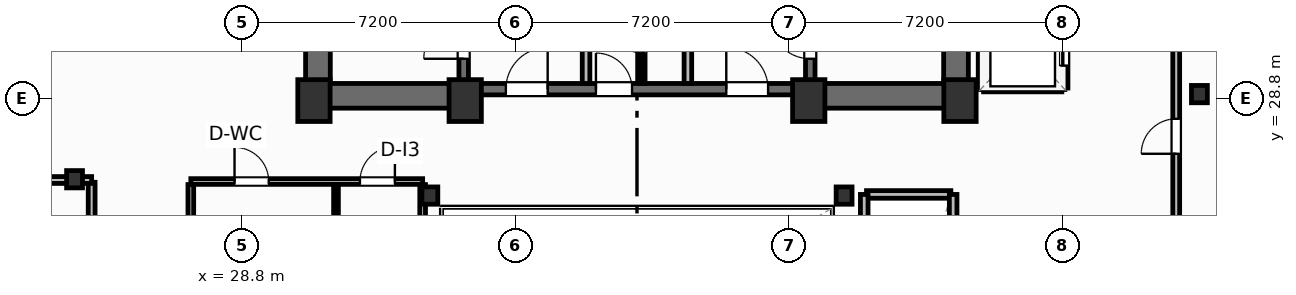
"""IFC4 building model, lengths in metres.
Left out: names, types, materials, properties, quantities, classifications, styles, units other than length and angle.
Written with IfcOpenShell. Run it as: python <this file> out.ifc"""

import sys

from ifc_helpers import new_model, si_unit, direction, frame, frame_2d, origin, origin_2d, place, context, subcontext, project, spatial, rectangle, i_section, extrude, element, fill, save


model = new_model("IFC4")
c1 = context("Model", 3, precision=1e-05, world=origin(), true_north=direction((0.0, 1.0)))
c2 = subcontext(c1, "Body", "Model", "MODEL_VIEW")
j1 = project(units=[si_unit("LENGTHUNIT", "METRE"), si_unit("PLANEANGLEUNIT", "RADIAN")], contexts=[c1])
p1 = place(None, origin())
s1 = spatial("IfcSite", under=j1, at=p1, CompositionType="ELEMENT")
p2 = place(p1, origin())
s2 = spatial("IfcBuilding", under=s1, at=p2, CompositionType="ELEMENT")
p3 = place(p2, frame((0.0, 0.0, 182.0)))
s3 = spatial("IfcBuildingStorey", under=s2, at=p3, CompositionType="ELEMENT", Elevation=182.0)
for number, where, z_axis, x_axis in (
    (1, (30.7, 28.75, 0.0), (0.0, 0.0, 1.0), (1.0, 0.0, 0.0)),
    (2, (34.68, 28.75, 0.0), (0.0, 0.0, 1.0), (1.0, 0.0, 0.0)),
    (3, (43.72, 28.75, 0.0), (0.0, 0.0, 1.0), (1.0, 0.0, 0.0)),
    (4, (47.7, 28.75, 0.0), (0.0, 0.0, 1.0), (1.0, 0.0, 0.0)),
):
    element("IfcColumn", number, at=place(p3, frame(where, z_axis=z_axis, x_axis=x_axis)), inside=s3, PredefinedType="COLUMN", context=c2, shape_type="SweptSolid", body=[
        extrude(rectangle(XDim=0.85, YDim=1.1, at=origin_2d()), origin(), (0.0, 0.0, 1.0), 3.7),
    ])
for number, where, z_axis, x_axis in (
    (5, (33.75, 26.25, 0.0), (0.0, 0.0, 1.0), (1.0, 0.0, 0.0)),
    (6, (44.65, 26.25, 0.0), (0.0, 0.0, 1.0), (1.0, 0.0, 0.0)),
    (7, (24.4, 26.68, 0.0), (0.0, 0.0, 1.0), (1.0, 0.0, 0.0)),
    (8, (54.0, 28.92, 0.0), (0.0, 0.0, 1.0), (1.0, 0.0, 0.0)),
):
    element("IfcColumn", number, at=place(p3, frame(where, z_axis=z_axis, x_axis=x_axis)), inside=s3, PredefinedType="COLUMN", context=c2, shape_type="SweptSolid", body=[
        extrude(i_section(OverallWidth=0.418, OverallDepth=0.455, WebThickness=0.042, FlangeThickness=0.068, FilletRadius=0.025, at=origin_2d()), origin(), (0.0, 0.0, 1.0), 3.7),
    ])
for number, where, z_axis, x_axis in (
    (9, (30.805, 29.2, 0.0), (0.0, 0.0, 1.0), (0.0, 1.0, 0.0)),
    (10, (47.595, 29.2, 0.0), (0.0, 0.0, 1.0), (0.0, 1.0, 0.0)),
):
    element("IfcWall", number, at=place(p3, frame(where, z_axis=z_axis, x_axis=x_axis)), inside=s3, PredefinedType="SHEAR", context=c2, shape_type="SweptSolid", body=[
        extrude(rectangle(XDim=9.22, YDim=0.65, at=frame_2d((4.61, 0.0))), origin(), (0.0, 0.0, 1.0), 3.45),
    ])
p4 = place(p3, frame((30.48, 28.875, 0.0), z_axis=(0.0, 0.0, 1.0), x_axis=(1.0, 0.0, 0.0)))
e11 = element("IfcWall", 11, at=p4, inside=s3, PredefinedType="SHEAR", context=c2, shape_type="SweptSolid", body=[
    extrude(rectangle(XDim=4.32, YDim=0.65, at=frame_2d((2.16, 0.0))), origin(), (0.0, 0.0, 1.0), 3.45),
])
p5 = place(p3, frame((43.6, 28.875, 0.0), z_axis=(0.0, 0.0, 1.0), x_axis=(1.0, 0.0, 0.0)))
e12 = element("IfcWall", 12, at=p5, inside=s3, PredefinedType="SHEAR", context=c2, shape_type="SweptSolid", body=[
    extrude(rectangle(XDim=4.32, YDim=0.65, at=frame_2d((2.16, 0.0))), origin(), (0.0, 0.0, 1.0), 3.45),
])
p6 = place(p3, frame((34.8, 29.05, 0.0), z_axis=(0.0, 0.0, 1.0), x_axis=(1.0, 0.0, 0.0)))
e13 = element("IfcWall", 13, at=p6, inside=s3, PredefinedType="SHEAR", context=c2, shape_type="SweptSolid", body=[
    extrude(rectangle(XDim=8.8, YDim=0.3, at=frame_2d((4.4, 0.0))), origin(), (0.0, 0.0, 1.0), 3.45),
])
p7 = place(p6, frame((0.95, 0.0, 0.0)))
e14 = element("IfcOpeningElement", 14, at=p7, cuts=e13, PredefinedType="OPENING", context=c2, shape_type="SweptSolid", body=[
    extrude(rectangle(XDim=1.1, YDim=2.15, at=frame_2d((0.55, 1.075))), frame((0.0, 0.16, 0.0), z_axis=(0.0, -1.0, 0.0), x_axis=(1.0, 0.0, 0.0)), (0.0, 0.0, 1.0), 0.32),
])
p8 = place(p6, frame((6.75, 0.0, 0.0)))
e15 = element("IfcOpeningElement", 15, at=p8, cuts=e13, PredefinedType="OPENING", context=c2, shape_type="SweptSolid", body=[
    extrude(rectangle(XDim=1.1, YDim=2.15, at=frame_2d((0.55, 1.075))), frame((0.0, 0.16, 0.0), z_axis=(0.0, -1.0, 0.0), x_axis=(1.0, 0.0, 0.0)), (0.0, 0.0, 1.0), 0.32),
])
p9 = place(p6, frame((3.32, 0.0, 0.0)))
e16 = element("IfcOpeningElement", 16, at=p9, cuts=e13, PredefinedType="OPENING", context=c2, shape_type="SweptSolid", body=[
    extrude(rectangle(XDim=0.95, YDim=2.15, at=frame_2d((0.475, 1.075))), frame((0.0, 0.16, 0.0), z_axis=(0.0, -1.0, 0.0), x_axis=(1.0, 0.0, 0.0)), (0.0, 0.0, 1.0), 0.32),
])
p10 = place(p3, frame((34.64, 29.2, 0.0), z_axis=(0.0, 0.0, 1.0), x_axis=(0.0, 1.0, 0.0)))
e17 = element("IfcWall", 17, at=p10, inside=s3, PredefinedType="SHEAR", context=c2, shape_type="SweptSolid", body=[
    extrude(rectangle(XDim=9.22, YDim=0.25, at=frame_2d((4.61, 0.0))), origin(), (0.0, 0.0, 1.0), 3.45),
])
p11 = place(p10, frame((0.65, 0.0, 0.0)))
e18 = element("IfcOpeningElement", 18, at=p11, cuts=e17, PredefinedType="OPENING", context=c2, shape_type="SweptSolid", body=[
    extrude(rectangle(XDim=1.05, YDim=2.15, at=frame_2d((0.525, 1.075))), frame((0.0, 0.135, 0.0), z_axis=(0.0, -1.0, 0.0), x_axis=(1.0, 0.0, 0.0)), (0.0, 0.0, 1.0), 0.27),
])
p12 = place(p3, frame((43.76, 29.2, 0.0), z_axis=(0.0, 0.0, 1.0), x_axis=(0.0, 1.0, 0.0)))
e19 = element("IfcWall", 19, at=p12, inside=s3, PredefinedType="SHEAR", context=c2, shape_type="SweptSolid", body=[
    extrude(rectangle(XDim=9.22, YDim=0.25, at=frame_2d((4.61, 0.0))), origin(), (0.0, 0.0, 1.0), 3.45),
])
p13 = place(p12, frame((0.65, 0.0, 0.0)))
e20 = element("IfcOpeningElement", 20, at=p13, cuts=e19, PredefinedType="OPENING", context=c2, shape_type="SweptSolid", body=[
    extrude(rectangle(XDim=1.05, YDim=2.15, at=frame_2d((0.525, 1.075))), frame((0.0, 0.135, 0.0), z_axis=(0.0, -1.0, 0.0), x_axis=(1.0, 0.0, 0.0)), (0.0, 0.0, 1.0), 0.27),
])
p14 = place(p3, frame((24.85, 23.03, 0.0), z_axis=(0.0, 0.0, 1.0), x_axis=(0.0, 1.0, 0.0)))
e21 = element("IfcWall", 21, at=p14, inside=s3, PredefinedType="PARTITIONING", context=c2, shape_type="SweptSolid", body=[
    extrude(rectangle(XDim=3.57, YDim=0.18, at=frame_2d((1.785, 0.0))), origin(), (0.0, 0.0, 1.0), 3.45),
])
p15 = place(p14, frame((1.5, 0.0, 0.0)))
e22 = element("IfcOpeningElement", 22, at=p15, cuts=e21, PredefinedType="OPENING", context=c2, shape_type="SweptSolid", body=[
    extrude(rectangle(XDim=0.92, YDim=2.05, at=frame_2d((0.46, 1.025))), frame((0.0, 0.1, 0.0), z_axis=(0.0, -1.0, 0.0), x_axis=(1.0, 0.0, 0.0)), (0.0, 0.0, 1.0), 0.2),
])
p16 = place(p3, frame((3.658, 26.66, 0.0), z_axis=(0.0, 0.0, 1.0), x_axis=(1.0, 0.0, 0.0)))
e23 = element("IfcWall", 23, at=p16, inside=s3, PredefinedType="PARTITIONING", context=c2, shape_type="SweptSolid", body=[
    extrude(rectangle(XDim=21.192, YDim=0.18, at=frame_2d((10.596, 0.0))), origin(), (0.0, 0.0, 1.0), 2.662),
])
p17 = place(p3, frame((53.39, 19.28, 0.0), z_axis=(0.0, 0.0, 1.0), x_axis=(0.0, 1.0, 0.0)))
e24 = element("IfcWall", 24, at=p17, inside=s3, PredefinedType="PARTITIONING", context=c2, shape_type="SweptSolid", body=[
    extrude(rectangle(XDim=20.02, YDim=0.18, at=frame_2d((10.01, 0.0))), origin(), (0.0, 0.0, 1.0), 3.45),
])
p18 = place(p17, frame((8.07, 0.0, 0.0)))
e25 = element("IfcOpeningElement", 25, at=p18, cuts=e24, PredefinedType="OPENING", context=c2, shape_type="SweptSolid", body=[
    extrude(rectangle(XDim=0.92, YDim=2.05, at=frame_2d((0.46, 1.025))), frame((0.0, 0.1, 0.0), z_axis=(0.0, -1.0, 0.0), x_axis=(1.0, 0.0, 0.0)), (0.0, 0.0, 1.0), 0.2),
])
for number, where, z_axis, x_axis in (
    (26, (37.86, 29.2, 0.0), (0.0, 0.0, 1.0), (0.0, 1.0, 0.0)),
    (27, (40.54, 29.2, 0.0), (0.0, 0.0, 1.0), (0.0, 1.0, 0.0)),
):
    element("IfcWall", number, at=place(p3, frame(where, z_axis=z_axis, x_axis=x_axis)), inside=s3, PredefinedType="PARTITIONING", context=c2, shape_type="SweptSolid", body=[
        extrude(rectangle(XDim=5.18, YDim=0.2, at=frame_2d((2.59, 0.0))), origin(), (0.0, 0.0, 1.0), 3.45),
    ])
p19 = place(p3, frame((39.35, 29.2, 0.0), z_axis=(0.0, 0.0, 1.0), x_axis=(0.0, 1.0, 0.0)))
e28 = element("IfcWall", 28, at=p19, inside=s3, PredefinedType="PARTITIONING", context=c2, shape_type="SweptSolid", body=[
    extrude(rectangle(XDim=5.22, YDim=0.125, at=frame_2d((2.61, 0.0))), origin(), (0.0, 0.0, 1.0), 3.45),
])
p20 = place(p19, frame((0.8, 0.0, 0.0)))
e29 = element("IfcOpeningElement", 29, at=p20, cuts=e28, PredefinedType="OPENING", context=c2, shape_type="SweptSolid", body=[
    extrude(rectangle(XDim=0.85, YDim=2.05, at=frame_2d((0.425, 1.025))), frame((0.0, 0.073, 0.0), z_axis=(0.0, -1.0, 0.0), x_axis=(1.0, 0.0, 0.0)), (0.0, 0.0, 1.0), 0.145),
])
p21 = place(p19, frame((3.4, 0.0, 0.0)))
e30 = element("IfcOpeningElement", 30, at=p21, cuts=e28, PredefinedType="OPENING", context=c2, shape_type="SweptSolid", body=[
    extrude(rectangle(XDim=0.85, YDim=2.05, at=frame_2d((0.425, 1.025))), frame((0.0, 0.073, 0.0), z_axis=(0.0, -1.0, 0.0), x_axis=(1.0, 0.0, 0.0)), (0.0, 0.0, 1.0), 0.145),
])
p22 = place(p3, frame((27.46, 26.62, 0.0), z_axis=(0.0, 0.0, 1.0), x_axis=(1.0, 0.0, 0.0)))
e31 = element("IfcWall", 31, at=p22, inside=s3, PredefinedType="PARTITIONING", context=c2, shape_type="SweptSolid", body=[
    extrude(rectangle(XDim=6.1, YDim=0.15, at=frame_2d((3.05, 0.0))), origin(), (0.0, 0.0, 1.0), 2.662),
])
p23 = place(p22, frame((1.15, 0.0, 0.0)))
e32 = element("IfcOpeningElement", 32, at=p23, cuts=e31, PredefinedType="OPENING", context=c2, shape_type="SweptSolid", body=[
    extrude(rectangle(XDim=0.9, YDim=2.05, at=frame_2d((0.45, 1.025))), frame((0.0, 0.085, 0.0), z_axis=(0.0, -1.0, 0.0), x_axis=(1.0, 0.0, 0.0)), (0.0, 0.0, 1.0), 0.17),
])
p24 = place(p22, frame((4.45, 0.0, 0.0)))
e33 = element("IfcOpeningElement", 33, at=p24, cuts=e31, PredefinedType="OPENING", context=c2, shape_type="SweptSolid", body=[
    extrude(rectangle(XDim=0.92, YDim=2.05, at=frame_2d((0.46, 1.025))), frame((0.0, 0.085, 0.0), z_axis=(0.0, -1.0, 0.0), x_axis=(1.0, 0.0, 0.0)), (0.0, 0.0, 1.0), 0.17),
])
p25 = place(p3, frame((31.28, 19.38, 0.0), z_axis=(0.0, 0.0, 1.0), x_axis=(0.0, 1.0, 0.0)))
e34 = element("IfcWall", 34, at=p25, inside=s3, PredefinedType="PARTITIONING", context=c2, shape_type="SweptSolid", body=[
    extrude(rectangle(XDim=7.16, YDim=0.125, at=frame_2d((3.58, 0.0))), origin(), (0.0, 0.0, 1.0), 3.45),
])
p26 = place(p3, frame((27.46, 19.38, 0.0), z_axis=(0.0, 0.0, 1.0), x_axis=(0.0, 1.0, 0.0)))
e35 = element("IfcWall", 35, at=p26, inside=s3, PredefinedType="PARTITIONING", context=c2, shape_type="SweptSolid", body=[
    extrude(rectangle(XDim=7.16, YDim=0.15, at=frame_2d((3.58, 0.0))), origin(), (0.0, 0.0, 1.0), 3.45),
])
p27 = place(p26, frame((1.4, 0.0, 0.0)))
e36 = element("IfcOpeningElement", 36, at=p27, cuts=e35, PredefinedType="OPENING", context=c2, shape_type="SweptSolid", body=[
    extrude(rectangle(XDim=0.95, YDim=2.05, at=frame_2d((0.475, 1.025))), frame((0.0, 0.085, 0.0), z_axis=(0.0, -1.0, 0.0), x_axis=(1.0, 0.0, 0.0)), (0.0, 0.0, 1.0), 0.17),
])
p28 = place(p3, frame((33.56, 19.38, 0.0), z_axis=(0.0, 0.0, 1.0), x_axis=(0.0, 1.0, 0.0)))
e37 = element("IfcWall", 37, at=p28, inside=s3, PredefinedType="PARTITIONING", context=c2, shape_type="SweptSolid", body=[
    extrude(rectangle(XDim=7.16, YDim=0.15, at=frame_2d((3.58, 0.0))), origin(), (0.0, 0.0, 1.0), 2.824),
])
p29 = place(p3, frame((48.32, 29.08, 0.0), z_axis=(0.0, 0.0, 1.0), x_axis=(1.0, 0.0, 0.0)))
e38 = element("IfcWall", 38, at=p29, inside=s3, PredefinedType="PARTITIONING", context=c2, shape_type="SweptSolid", body=[
    extrude(rectangle(XDim=2.06, YDim=0.2, at=frame_2d((1.03, 0.0))), origin(), (0.0, 0.0, 1.0), 2.662),
])
p30 = place(p3, frame((48.28, 29.08, 0.0), z_axis=(0.0, 0.0, 1.0), x_axis=(0.0, 1.0, 0.0)))
e39 = element("IfcWall", 39, at=p30, inside=s3, PredefinedType="PARTITIONING", context=c2, shape_type="SweptSolid", body=[
    extrude(rectangle(XDim=6.89, YDim=0.2, at=frame_2d((3.445, 0.0))), origin(), (0.0, 0.0, 1.0), 3.45),
])
p31 = place(p3, frame((50.44, 29.08, 0.0), z_axis=(0.0, 0.0, 1.0), x_axis=(0.0, 1.0, 0.0)))
e40 = element("IfcWall", 40, at=p31, inside=s3, PredefinedType="PARTITIONING", context=c2, shape_type="SweptSolid", body=[
    extrude(rectangle(XDim=6.89, YDim=0.2, at=frame_2d((3.445, 0.0))), origin(), (0.0, 0.0, 1.0), 3.45),
])
p32 = place(p31, frame((0.59, 0.0, 0.0)))
e41 = element("IfcOpeningElement", 41, at=p32, cuts=e40, PredefinedType="OPENING", context=c2, shape_type="SweptSolid", body=[
    extrude(rectangle(XDim=1.1, YDim=2.15, at=frame_2d((0.55, 1.075))), frame((0.0, 0.11, 0.0), z_axis=(0.0, -1.0, 0.0), x_axis=(1.0, 0.0, 0.0)), (0.0, 0.0, 1.0), 0.22),
])
p33 = place(p31, frame((2.89, 0.0, 0.0)))
e42 = element("IfcOpeningElement", 42, at=p33, cuts=e40, PredefinedType="OPENING", context=c2, shape_type="SweptSolid", body=[
    extrude(rectangle(XDim=1.1, YDim=2.15, at=frame_2d((0.55, 1.075))), frame((0.0, 0.11, 0.0), z_axis=(0.0, -1.0, 0.0), x_axis=(1.0, 0.0, 0.0)), (0.0, 0.0, 1.0), 0.22),
])
p34 = place(p31, frame((5.19, 0.0, 0.0)))
e43 = element("IfcOpeningElement", 43, at=p34, cuts=e40, PredefinedType="OPENING", context=c2, shape_type="SweptSolid", body=[
    extrude(rectangle(XDim=1.1, YDim=2.15, at=frame_2d((0.55, 1.075))), frame((0.0, 0.11, 0.0), z_axis=(0.0, -1.0, 0.0), x_axis=(1.0, 0.0, 0.0)), (0.0, 0.0, 1.0), 0.22),
])
p35 = place(p3, frame((45.24, 26.28, 0.0), z_axis=(0.0, 0.0, 1.0), x_axis=(1.0, 0.0, 0.0)))
e44 = element("IfcWall", 44, at=p35, inside=s3, PredefinedType="PARTITIONING", context=c2, shape_type="SweptSolid", body=[
    extrude(rectangle(XDim=2.22, YDim=0.2, at=frame_2d((1.11, 0.0))), origin(), (0.0, 0.0, 1.0), 3.45),
])
for number, where, z_axis, x_axis in (
    (45, (45.18, 19.38, 0.0), (0.0, 0.0, 1.0), (0.0, 1.0, 0.0)),
    (46, (47.52, 19.38, 0.0), (0.0, 0.0, 1.0), (0.0, 1.0, 0.0)),
):
    element("IfcWall", number, at=place(p3, frame(where, z_axis=z_axis, x_axis=x_axis)), inside=s3, PredefinedType="PARTITIONING", context=c2, shape_type="SweptSolid", body=[
        extrude(rectangle(XDim=6.9, YDim=0.2, at=frame_2d((3.45, 0.0))), origin(), (0.0, 0.0, 1.0), 3.45),
    ])
p36 = place(p18, origin())
e47 = element("IfcDoor", 47, at=p36, inside=s3, OperationType="SINGLE_SWING_LEFT", PredefinedType="DOOR", context=c2, shape_type="SweptSolid", body=[
    extrude(rectangle(XDim=0.92, YDim=2.05, at=frame_2d((0.46, 1.025))), frame((0.0, 0.025, 0.0), z_axis=(0.0, -1.0, 0.0), x_axis=(1.0, 0.0, 0.0)), (0.0, 0.0, 1.0), 0.05),
])
fill(e25, e47)
p37 = place(p11, origin())
e48 = element("IfcDoor", 48, at=p37, inside=s3, OperationType="SINGLE_SWING_LEFT", PredefinedType="DOOR", context=c2, shape_type="SweptSolid", body=[
    extrude(rectangle(XDim=1.05, YDim=2.15, at=frame_2d((0.525, 1.075))), frame((0.0, 0.025, 0.0), z_axis=(0.0, -1.0, 0.0), x_axis=(1.0, 0.0, 0.0)), (0.0, 0.0, 1.0), 0.05),
])
fill(e18, e48)
p38 = place(p13, origin())
e49 = element("IfcDoor", 49, at=p38, inside=s3, OperationType="SINGLE_SWING_RIGHT", PredefinedType="DOOR", context=c2, shape_type="SweptSolid", body=[
    extrude(rectangle(XDim=1.05, YDim=2.15, at=frame_2d((0.525, 1.075))), frame((0.0, 0.025, 0.0), z_axis=(0.0, -1.0, 0.0), x_axis=(1.0, 0.0, 0.0)), (0.0, 0.0, 1.0), 0.05),
])
fill(e20, e49)
p39 = place(p7, origin())
e50 = element("IfcDoor", 50, at=p39, inside=s3, OperationType="SINGLE_SWING_RIGHT", PredefinedType="DOOR", context=c2, shape_type="SweptSolid", body=[
    extrude(rectangle(XDim=1.1, YDim=2.15, at=frame_2d((0.55, 1.075))), frame((0.0, 0.025, 0.0), z_axis=(0.0, -1.0, 0.0), x_axis=(1.0, 0.0, 0.0)), (0.0, 0.0, 1.0), 0.05),
])
fill(e14, e50)
p40 = place(p8, origin())
e51 = element("IfcDoor", 51, at=p40, inside=s3, OperationType="SINGLE_SWING_LEFT", PredefinedType="DOOR", context=c2, shape_type="SweptSolid", body=[
    extrude(rectangle(XDim=1.1, YDim=2.15, at=frame_2d((0.55, 1.075))), frame((0.0, 0.025, 0.0), z_axis=(0.0, -1.0, 0.0), x_axis=(1.0, 0.0, 0.0)), (0.0, 0.0, 1.0), 0.05),
])
fill(e15, e51)
p41 = place(p20, origin())
e52 = element("IfcDoor", 52, at=p41, inside=s3, OperationType="SINGLE_SWING_RIGHT", PredefinedType="DOOR", context=c2, shape_type="SweptSolid", body=[
    extrude(rectangle(XDim=0.85, YDim=2.05, at=frame_2d((0.425, 1.025))), frame((0.0, 0.025, 0.0), z_axis=(0.0, -1.0, 0.0), x_axis=(1.0, 0.0, 0.0)), (0.0, 0.0, 1.0), 0.05),
])
fill(e29, e52)
p42 = place(p9, origin())
e53 = element("IfcDoor", 53, at=p42, inside=s3, OperationType="SINGLE_SWING_LEFT", PredefinedType="DOOR", context=c2, shape_type="SweptSolid", body=[
    extrude(rectangle(XDim=0.95, YDim=2.15, at=frame_2d((0.475, 1.075))), frame((0.0, 0.025, 0.0), z_axis=(0.0, -1.0, 0.0), x_axis=(1.0, 0.0, 0.0)), (0.0, 0.0, 1.0), 0.05),
])
fill(e16, e53)
p43 = place(p23, origin())
e54 = element("IfcDoor", 54, at=p43, inside=s3, OperationType="SINGLE_SWING_LEFT", PredefinedType="DOOR", context=c2, shape_type="SweptSolid", body=[
    extrude(rectangle(XDim=0.9, YDim=2.05, at=frame_2d((0.45, 1.025))), frame((0.0, 0.025, 0.0), z_axis=(0.0, -1.0, 0.0), x_axis=(1.0, 0.0, 0.0)), (0.0, 0.0, 1.0), 0.05),
])
fill(e32, e54)
p44 = place(p24, origin())
e55 = element("IfcDoor", 55, at=p44, inside=s3, OperationType="SINGLE_SWING_RIGHT", PredefinedType="DOOR", context=c2, shape_type="SweptSolid", body=[
    extrude(rectangle(XDim=0.92, YDim=2.05, at=frame_2d((0.46, 1.025))), frame((0.0, 0.025, 0.0), z_axis=(0.0, -1.0, 0.0), x_axis=(1.0, 0.0, 0.0)), (0.0, 0.0, 1.0), 0.05),
])
fill(e33, e55)
p45 = place(p32, origin())
e56 = element("IfcDoor", 56, at=p45, inside=s3, OperationType="SLIDING_TO_LEFT", PredefinedType="DOOR", context=c2, shape_type="SweptSolid", body=[
    extrude(rectangle(XDim=1.1, YDim=2.15, at=frame_2d((0.55, 1.075))), frame((0.0, 0.025, 0.0), z_axis=(0.0, -1.0, 0.0), x_axis=(1.0, 0.0, 0.0)), (0.0, 0.0, 1.0), 0.05),
])
fill(e41, e56)
save(model, sys.argv[1])
